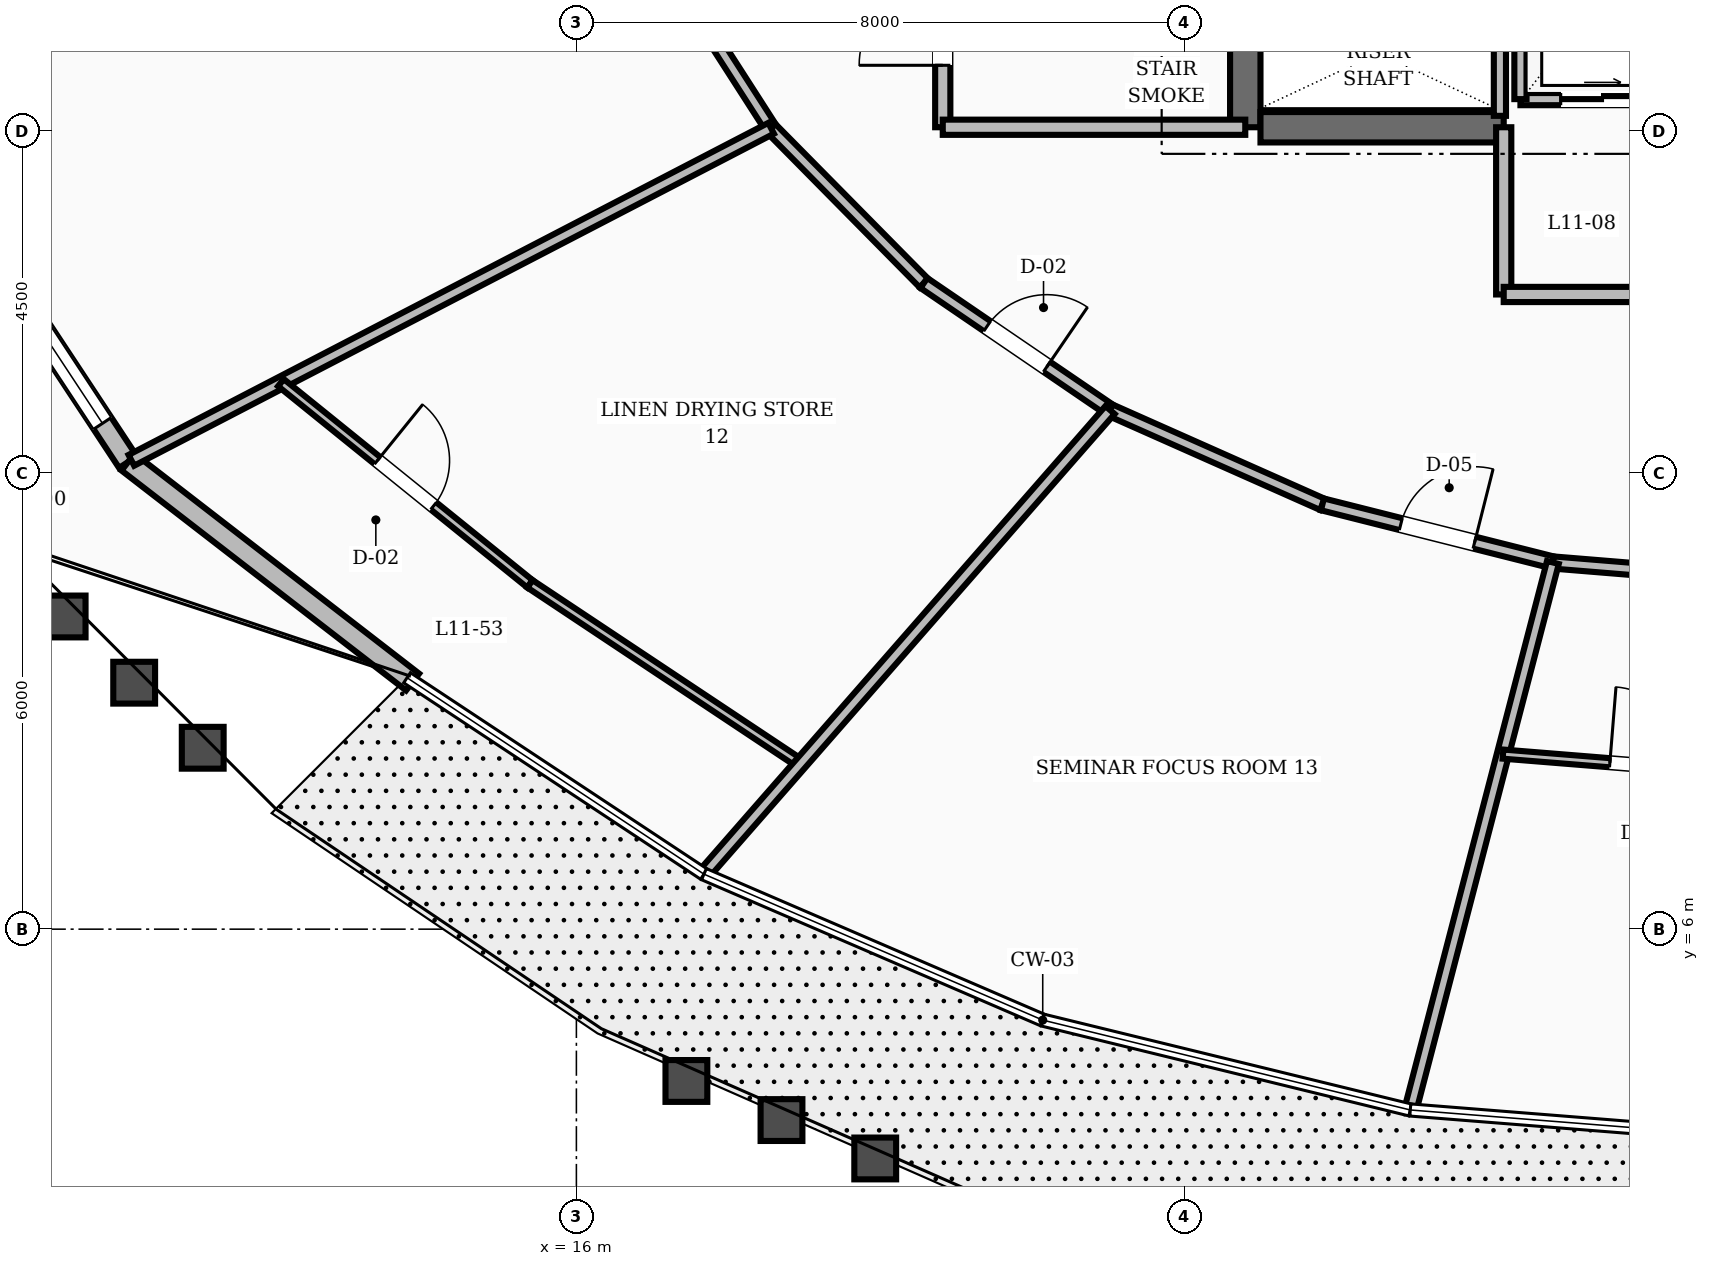
"""IFC4 building model, lengths in metres.
Left out: names, types, materials, properties, quantities, classifications, styles, units other than length and angle.
Written with IfcOpenShell. Run it as: python <this file> out.ifc"""

import sys

from ifc_helpers import new_model, si_unit, direction, frame, frame_2d, origin, place, context, subcontext, project, spatial, rectangle, extrude, element, fill, save


model = new_model("IFC4")
c1 = context("Model", 3, precision=1e-05, world=origin(), true_north=direction((0.0, 1.0)))
c2 = subcontext(c1, "Body", "Model", "MODEL_VIEW")
j1 = project(units=[si_unit("LENGTHUNIT", "METRE"), si_unit("PLANEANGLEUNIT", "RADIAN")], contexts=[c1])
p1 = place(None, origin())
s1 = spatial("IfcSite", under=j1, at=p1, CompositionType="ELEMENT")
p2 = place(p1, origin())
s2 = spatial("IfcBuilding", under=s1, at=p2, CompositionType="ELEMENT")
p3 = place(p2, frame((0.0, 0.0, 48.4)))
s3 = spatial("IfcBuildingStorey", under=s2, at=p3, CompositionType="ELEMENT", Elevation=48.4)
p4 = place(p3, frame((24.8, 16.55, 0.0), z_axis=(0.0, 0.0, 1.0), x_axis=(0.0, 1.0, 0.0)))
e1 = element("IfcWall", 1, at=p4, inside=s3, PredefinedType="SHEAR", context=c2, shape_type="SweptSolid", body=[
    extrude(rectangle(XDim=6.3, YDim=0.4, at=frame_2d((3.15, 0.0))), origin(), (0.0, 0.0, 1.0), 3.6),
])
p5 = place(p3, frame((25.0, 16.55, 0.0), z_axis=(0.0, 0.0, 1.0), x_axis=(1.0, 0.0, 0.0)))
e2 = element("IfcWall", 2, at=p5, inside=s3, PredefinedType="SHEAR", context=c2, shape_type="SweptSolid", body=[
    extrude(rectangle(XDim=3.2, YDim=0.4, at=frame_2d((1.6, 0.0))), origin(), (0.0, 0.0, 1.0), 3.6),
])
p6 = place(p3, frame((7.667, 15.834, 0.0), z_axis=(0.0, 0.0, 1.0), x_axis=(0.550703673424, -0.834700823096, 0.0)))
e3 = element("IfcWall", 3, at=p6, inside=s3, PredefinedType="STANDARD", context=c2, shape_type="SweptSolid", body=[
    extrude(rectangle(XDim=4.419, YDim=0.28, at=frame_2d((2.21, 0.0))), origin(), (0.0, 0.0, 1.0), 2.65),
])
p7 = place(p6, frame((0.61, 0.0, 0.8)))
e4 = element("IfcOpeningElement", 4, at=p7, cuts=e3, PredefinedType="OPENING", context=c2, shape_type="SweptSolid", body=[
    extrude(rectangle(XDim=3.2, YDim=1.65, at=frame_2d((1.6, 0.825))), frame((0.0, 0.15, 0.0), z_axis=(0.0, -1.0, 0.0), x_axis=(1.0, 0.0, 0.0)), (0.0, 0.0, 1.0), 0.3),
])
p8 = place(p3, frame((10.101, 12.145, 0.0), z_axis=(0.0, 0.0, 1.0), x_axis=(0.791223727065, -0.611526789052, 0.0)))
e5 = element("IfcWall", 5, at=p8, inside=s3, PredefinedType="STANDARD", context=c2, shape_type="SweptSolid", body=[
    extrude(rectangle(XDim=4.732, YDim=0.28, at=frame_2d((2.366, 0.0))), origin(), (0.0, 0.0, 1.0), 2.65),
])
p9 = place(p3, frame((20.82, 16.55, 0.0), z_axis=(0.0, 0.0, 1.0), x_axis=(0.0, 1.0, 0.0)))
e6 = element("IfcWall", 6, at=p9, inside=s3, PredefinedType="SOLIDWALL", context=c2, shape_type="SweptSolid", body=[
    extrude(rectangle(XDim=2.73, YDim=0.2, at=frame_2d((1.365, 0.0))), origin(), (0.0, 0.0, 1.0), 2.61),
])
p10 = place(p9, frame((0.815, 0.0, 0.0)))
e7 = element("IfcOpeningElement", 7, at=p10, cuts=e6, PredefinedType="OPENING", context=c2, shape_type="SweptSolid", body=[
    extrude(rectangle(XDim=1.1, YDim=2.1, at=frame_2d((0.55, 1.05))), frame((0.0, 0.11, 0.0), z_axis=(0.0, -1.0, 0.0), x_axis=(1.0, 0.0, 0.0)), (0.0, 0.0, 1.0), 0.22),
])
p11 = place(p3, frame((20.82, 16.55, 0.0), z_axis=(0.0, 0.0, 1.0), x_axis=(1.0, 0.0, 0.0)))
e8 = element("IfcWall", 8, at=p11, inside=s3, PredefinedType="SOLIDWALL", context=c2, shape_type="SweptSolid", body=[
    extrude(rectangle(XDim=3.98, YDim=0.2, at=frame_2d((1.99, 0.0))), origin(), (0.0, 0.0, 1.0), 2.61),
])
p12 = place(p3, frame((28.2, 14.35, 0.0), z_axis=(0.0, 0.0, 1.0), x_axis=(0.0, 1.0, 0.0)))
e9 = element("IfcWall", 9, at=p12, inside=s3, PredefinedType="SOLIDWALL", context=c2, shape_type="SweptSolid", body=[
    extrude(rectangle(XDim=2.2, YDim=0.2, at=frame_2d((1.1, 0.0))), origin(), (0.0, 0.0, 1.0), 2.61),
])
p13 = place(p3, frame((28.2, 14.35, 0.0), z_axis=(0.0, 0.0, 1.0), x_axis=(1.0, 0.0, 0.0)))
e10 = element("IfcWall", 10, at=p13, inside=s3, PredefinedType="SOLIDWALL", context=c2, shape_type="SweptSolid", body=[
    extrude(rectangle(XDim=7.6, YDim=0.2, at=frame_2d((3.8, 0.0))), origin(), (0.0, 0.0, 1.0), 2.61),
])
p14 = place(p13, frame((3.2, 0.0, 0.0)))
e11 = element("IfcOpeningElement", 11, at=p14, cuts=e10, PredefinedType="OPENING", context=c2, shape_type="SweptSolid", body=[
    extrude(rectangle(XDim=1.2, YDim=2.1, at=frame_2d((0.6, 1.05))), frame((0.0, 0.11, 0.0), z_axis=(0.0, -1.0, 0.0), x_axis=(1.0, 0.0, 0.0)), (0.0, 0.0, 1.0), 0.22),
])
p15 = place(p3, frame((28.42, 16.92, 0.0), z_axis=(0.0, 0.0, 1.0), x_axis=(1.0, 0.0, 0.0)))
e12 = element("IfcWall", 12, at=p15, inside=s3, PredefinedType="SOLIDWALL", context=c2, shape_type="SweptSolid", body=[
    extrude(rectangle(XDim=7.16, YDim=0.16, at=frame_2d((3.58, 0.0))), origin(), (0.0, 0.0, 1.0), 2.61),
])
p16 = place(p15, frame((0.53, 0.0, 0.0)))
e13 = element("IfcOpeningElement", 13, at=p16, cuts=e12, PredefinedType="OPENING", context=c2, shape_type="SweptSolid", body=[
    extrude(rectangle(XDim=1.1, YDim=2.15, at=frame_2d((0.55, 1.075))), frame((0.0, 0.09, 0.0), z_axis=(0.0, -1.0, 0.0), x_axis=(1.0, 0.0, 0.0)), (0.0, 0.0, 1.0), 0.18),
])
p17 = place(p15, frame((3.03, 0.0, 0.0)))
e14 = element("IfcOpeningElement", 14, at=p17, cuts=e12, PredefinedType="OPENING", context=c2, shape_type="SweptSolid", body=[
    extrude(rectangle(XDim=1.1, YDim=2.15, at=frame_2d((0.55, 1.075))), frame((0.0, 0.09, 0.0), z_axis=(0.0, -1.0, 0.0), x_axis=(1.0, 0.0, 0.0)), (0.0, 0.0, 1.0), 0.18),
])
p18 = place(p15, frame((5.53, 0.0, 0.0)))
e15 = element("IfcOpeningElement", 15, at=p18, cuts=e12, PredefinedType="OPENING", context=c2, shape_type="SweptSolid", body=[
    extrude(rectangle(XDim=1.1, YDim=2.15, at=frame_2d((0.55, 1.075))), frame((0.0, 0.09, 0.0), z_axis=(0.0, -1.0, 0.0), x_axis=(1.0, 0.0, 0.0)), (0.0, 0.0, 1.0), 0.18),
])
p19 = place(p3, frame((28.42, 16.92, 0.0), z_axis=(0.0, 0.0, 1.0), x_axis=(0.0, 1.0, 0.0)))
e16 = element("IfcWall", 16, at=p19, inside=s3, PredefinedType="SOLIDWALL", context=c2, shape_type="SweptSolid", body=[
    extrude(rectangle(XDim=2.76, YDim=0.16, at=frame_2d((1.38, 0.0))), origin(), (0.0, 0.0, 1.0), 2.61),
])
p20 = place(p3, frame((28.15, 16.7, 0.0), z_axis=(0.0, 0.0, 1.0), x_axis=(0.0, 1.0, 0.0)))
e17 = element("IfcWall", 17, at=p20, inside=s3, PredefinedType="SOLIDWALL", context=c2, shape_type="SweptSolid", body=[
    extrude(rectangle(XDim=6.05, YDim=0.16, at=frame_2d((3.025, 0.0))), origin(), (0.0, 0.0, 1.0), 2.61),
])
p21 = place(p3, frame((17.068, 18.859, 0.0), z_axis=(0.0, 0.0, 1.0), x_axis=(0.540891657444, -0.841092274907, 0.0)))
e18 = element("IfcWall", 18, at=p21, inside=s3, PredefinedType="SOLIDWALL", context=c2, shape_type="SweptSolid", body=[
    extrude(rectangle(XDim=2.761, YDim=0.16, at=frame_2d((1.38, 0.0))), origin(), (0.0, 0.0, 1.0), 2.61),
])
p22 = place(p3, frame((18.562, 16.537, 0.0), z_axis=(0.0, 0.0, 1.0), x_axis=(0.702569520063, -0.711615113301, 0.0)))
e19 = element("IfcWall", 19, at=p22, inside=s3, PredefinedType="SOLIDWALL", context=c2, shape_type="SweptSolid", body=[
    extrude(rectangle(XDim=2.861, YDim=0.16, at=frame_2d((1.43, 0.0))), origin(), (0.0, 0.0, 1.0), 2.61),
])
p23 = place(p3, frame((20.572, 14.501, 0.0), z_axis=(0.0, 0.0, 1.0), x_axis=(0.826112340767, -0.563505457323, 0.0)))
e20 = element("IfcWall", 20, at=p23, inside=s3, PredefinedType="SOLIDWALL", context=c2, shape_type="SweptSolid", body=[
    extrude(rectangle(XDim=2.965, YDim=0.16, at=frame_2d((1.482, 0.0))), origin(), (0.0, 0.0, 1.0), 2.61),
])
p24 = place(p23, frame((1.007, 0.0, 0.0)))
e21 = element("IfcOpeningElement", 21, at=p24, cuts=e20, PredefinedType="OPENING", context=c2, shape_type="SweptSolid", body=[
    extrude(rectangle(XDim=0.95, YDim=2.1, at=frame_2d((0.475, 1.05))), frame((0.0, 0.09, 0.0), z_axis=(0.0, -1.0, 0.0), x_axis=(1.0, 0.0, 0.0)), (0.0, 0.0, 1.0), 0.18),
])
p25 = place(p3, frame((23.021, 12.83, 0.0), z_axis=(0.0, 0.0, 1.0), x_axis=(0.913860932409, -0.406027334321, 0.0)))
e22 = element("IfcWall", 22, at=p25, inside=s3, PredefinedType="SOLIDWALL", context=c2, shape_type="SweptSolid", body=[
    extrude(rectangle(XDim=3.058, YDim=0.16, at=frame_2d((1.529, 0.0))), origin(), (0.0, 0.0, 1.0), 2.61),
])
p26 = place(p3, frame((25.815, 11.589, 0.0), z_axis=(0.0, 0.0, 1.0), x_axis=(0.969653665365, -0.244482656326, 0.0)))
e23 = element("IfcWall", 23, at=p26, inside=s3, PredefinedType="SOLIDWALL", context=c2, shape_type="SweptSolid", body=[
    extrude(rectangle(XDim=3.127, YDim=0.16, at=frame_2d((1.563, 0.0))), origin(), (0.0, 0.0, 1.0), 2.61),
])
p27 = place(p26, frame((1.063, 0.0, 0.0)))
e24 = element("IfcOpeningElement", 24, at=p27, cuts=e23, PredefinedType="OPENING", context=c2, shape_type="SweptSolid", body=[
    extrude(rectangle(XDim=1.0, YDim=2.1, at=frame_2d((0.5, 1.05))), frame((0.0, 0.09, 0.0), z_axis=(0.0, -1.0, 0.0), x_axis=(1.0, 0.0, 0.0)), (0.0, 0.0, 1.0), 0.18),
])
p28 = place(p3, frame((28.847, 10.824, 0.0), z_axis=(0.0, 0.0, 1.0), x_axis=(0.996661331307, -0.081646743207, 0.0)))
e25 = element("IfcWall", 25, at=p28, inside=s3, PredefinedType="SOLIDWALL", context=c2, shape_type="SweptSolid", body=[
    extrude(rectangle(XDim=3.164, YDim=0.16, at=frame_2d((1.582, 0.0))), origin(), (0.0, 0.0, 1.0), 2.61),
])
p29 = place(p3, frame((28.847, 10.824, 0.0), z_axis=(0.0, 0.0, 1.0), x_axis=(-0.252026659799, -0.967720291588, 0.0)))
e26 = element("IfcWall", 26, at=p29, inside=s3, PredefinedType="SOLIDWALL", context=c2, shape_type="SweptSolid", body=[
    extrude(rectangle(XDim=7.393, YDim=0.16, at=frame_2d((3.697, 0.0))), origin(), (0.0, 0.0, 1.0), 2.61),
])
p30 = place(p3, frame((28.19, 8.303, 0.0), z_axis=(0.0, 0.0, 1.0), x_axis=(0.996760817286, -0.080423088244, 0.0)))
e27 = element("IfcWall", 27, at=p30, inside=s3, PredefinedType="PARTITIONING", context=c2, shape_type="SweptSolid", body=[
    extrude(rectangle(XDim=3.822, YDim=0.12, at=frame_2d((1.911, 0.0))), origin(), (0.0, 0.0, 1.0), 2.61),
])
p31 = place(p30, frame((1.411, 0.0, 0.0)))
e28 = element("IfcOpeningElement", 28, at=p31, cuts=e27, PredefinedType="OPENING", context=c2, shape_type="SweptSolid", body=[
    extrude(rectangle(XDim=1.0, YDim=2.1, at=frame_2d((0.5, 1.05))), frame((0.0, 0.07, 0.0), z_axis=(0.0, -1.0, 0.0), x_axis=(1.0, 0.0, 0.0)), (0.0, 0.0, 1.0), 0.14),
])
p32 = place(p3, frame((18.562, 16.537, 0.0), z_axis=(0.0, 0.0, 1.0), x_axis=(-0.887569366449, -0.460674092762, 0.0)))
e29 = element("IfcWall", 29, at=p32, inside=s3, PredefinedType="SOLIDWALL", context=c2, shape_type="SweptSolid", body=[
    extrude(rectangle(XDim=9.483, YDim=0.16, at=frame_2d((4.741, 0.0))), origin(), (0.0, 0.0, 1.0), 2.61),
])
p33 = place(p3, frame((12.113, 13.189, 0.0), z_axis=(0.0, 0.0, 1.0), x_axis=(0.777868157484, -0.628427505424, 0.0)))
e30 = element("IfcWall", 30, at=p33, inside=s3, PredefinedType="PARTITIONING", context=c2, shape_type="SweptSolid", body=[
    extrude(rectangle(XDim=4.212, YDim=0.12, at=frame_2d((2.106, 0.0))), origin(), (0.0, 0.0, 1.0), 2.61),
])
p34 = place(p33, frame((1.631, 0.0, 0.0)))
e31 = element("IfcOpeningElement", 31, at=p34, cuts=e30, PredefinedType="OPENING", context=c2, shape_type="SweptSolid", body=[
    extrude(rectangle(XDim=0.95, YDim=2.1, at=frame_2d((0.475, 1.05))), frame((0.0, 0.07, 0.0), z_axis=(0.0, -1.0, 0.0), x_axis=(1.0, 0.0, 0.0)), (0.0, 0.0, 1.0), 0.14),
])
p35 = place(p3, frame((15.389, 10.543, 0.0), z_axis=(0.0, 0.0, 1.0), x_axis=(0.83272621364, -0.553684976424, 0.0)))
e32 = element("IfcWall", 32, at=p35, inside=s3, PredefinedType="PARTITIONING", context=c2, shape_type="SweptSolid", body=[
    extrude(rectangle(XDim=4.275, YDim=0.12, at=frame_2d((2.137, 0.0))), origin(), (0.0, 0.0, 1.0), 2.61),
])
p36 = place(p3, frame((23.021, 12.83, 0.0), z_axis=(0.0, 0.0, 1.0), x_axis=(-0.658457449962, -0.752617955267, 0.0)))
e33 = element("IfcWall", 33, at=p36, inside=s3, PredefinedType="SOLIDWALL", context=c2, shape_type="SweptSolid", body=[
    extrude(rectangle(XDim=8.064, YDim=0.16, at=frame_2d((4.032, 0.0))), origin(), (0.0, 0.0, 1.0), 2.61),
])
p37 = place(p7, origin())
e34 = element("IfcWindow", 34, at=p37, inside=s3, PartitioningType="SINGLE_PANEL", PredefinedType="WINDOW", context=c2, shape_type="SweptSolid", body=[
    extrude(rectangle(XDim=3.2, YDim=1.65, at=frame_2d((1.6, 0.825))), frame((0.0, 0.03, 0.0), z_axis=(0.0, -1.0, 0.0), x_axis=(1.0, 0.0, 0.0)), (0.0, 0.0, 1.0), 0.06),
])
fill(e4, e34)
p38 = place(p10, origin())
e35 = element("IfcDoor", 35, at=p38, inside=s3, OperationType="SINGLE_SWING_LEFT", PredefinedType="DOOR", context=c2, shape_type="SweptSolid", body=[
    extrude(rectangle(XDim=1.1, YDim=2.1, at=frame_2d((0.55, 1.05))), frame((0.0, 0.025, 0.0), z_axis=(0.0, -1.0, 0.0), x_axis=(1.0, 0.0, 0.0)), (0.0, 0.0, 1.0), 0.05),
])
fill(e7, e35)
p39 = place(p16, origin())
e36 = element("IfcDoor", 36, at=p39, inside=s3, OperationType="SLIDING_TO_RIGHT", PredefinedType="DOOR", context=c2, shape_type="SweptSolid", body=[
    extrude(rectangle(XDim=1.1, YDim=2.15, at=frame_2d((0.55, 1.075))), frame((0.0, 0.025, 0.0), z_axis=(0.0, -1.0, 0.0), x_axis=(1.0, 0.0, 0.0)), (0.0, 0.0, 1.0), 0.05),
])
fill(e13, e36)
p40 = place(p31, origin())
e37 = element("IfcDoor", 37, at=p40, inside=s3, OperationType="SINGLE_SWING_LEFT", PredefinedType="DOOR", context=c2, shape_type="SweptSolid", body=[
    extrude(rectangle(XDim=1.0, YDim=2.1, at=frame_2d((0.5, 1.05))), frame((0.0, 0.025, 0.0), z_axis=(0.0, -1.0, 0.0), x_axis=(1.0, 0.0, 0.0)), (0.0, 0.0, 1.0), 0.05),
])
fill(e28, e37)
p41 = place(p24, origin())
e38 = element("IfcDoor", 38, at=p41, inside=s3, OperationType="SINGLE_SWING_RIGHT", PredefinedType="DOOR", context=c2, shape_type="SweptSolid", body=[
    extrude(rectangle(XDim=0.95, YDim=2.1, at=frame_2d((0.475, 1.05))), frame((0.0, 0.025, 0.0), z_axis=(0.0, -1.0, 0.0), x_axis=(1.0, 0.0, 0.0)), (0.0, 0.0, 1.0), 0.05),
])
fill(e21, e38)
p42 = place(p34, origin())
e39 = element("IfcDoor", 39, at=p42, inside=s3, OperationType="SINGLE_SWING_LEFT", PredefinedType="DOOR", context=c2, shape_type="SweptSolid", body=[
    extrude(rectangle(XDim=0.95, YDim=2.1, at=frame_2d((0.475, 1.05))), frame((0.0, 0.025, 0.0), z_axis=(0.0, -1.0, 0.0), x_axis=(1.0, 0.0, 0.0)), (0.0, 0.0, 1.0), 0.05),
])
fill(e31, e39)
p43 = place(p27, origin())
e40 = element("IfcDoor", 40, at=p43, inside=s3, OperationType="SINGLE_SWING_RIGHT", PredefinedType="DOOR", context=c2, shape_type="SweptSolid", body=[
    extrude(rectangle(XDim=1.0, YDim=2.1, at=frame_2d((0.5, 1.05))), frame((0.0, 0.025, 0.0), z_axis=(0.0, -1.0, 0.0), x_axis=(1.0, 0.0, 0.0)), (0.0, 0.0, 1.0), 0.05),
])
fill(e24, e40)
save(model, sys.argv[1])
